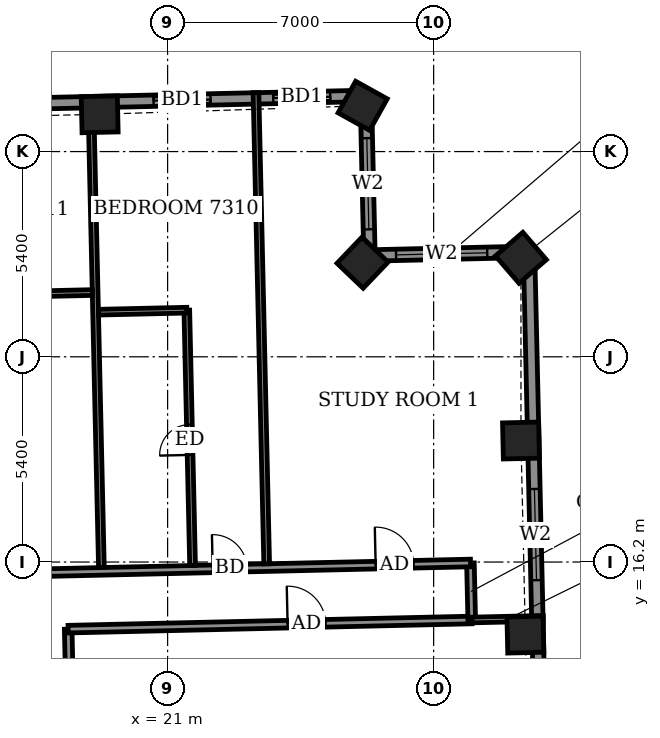
"""IFC4 building model, lengths in metres.
Left out: names, types, materials, properties, quantities, classifications, styles, units other than length and angle.
Written with IfcOpenShell. Run it as: python <this file> out.ifc"""

import sys

from ifc_helpers import new_model, si_unit, direction, frame, frame_2d, origin, origin_2d, place, context, subcontext, project, spatial, rectangle, extrude, element, fill, save


model = new_model("IFC4")
c1 = context("Model", 3, precision=1e-05, world=origin(), true_north=direction((0.0, 1.0)))
c2 = subcontext(c1, "Body", "Model", "MODEL_VIEW")
j1 = project(units=[si_unit("LENGTHUNIT", "METRE"), si_unit("PLANEANGLEUNIT", "RADIAN")], contexts=[c1])
p1 = place(None, origin())
s1 = spatial("IfcSite", under=j1, at=p1, CompositionType="ELEMENT")
p2 = place(p1, origin())
s2 = spatial("IfcBuilding", under=s1, at=p2, CompositionType="ELEMENT")
p3 = place(p2, frame((0.0, 0.0, 287.1)))
s3 = spatial("IfcBuildingStorey", under=s2, at=p3, CompositionType="ELEMENT", Elevation=287.1)
for number, where, z_axis, x_axis in (
    (1, (30.414, 14.29, -0.55), (0.0, 0.0, 1.0), (-0.023, 1.0, 0.0)),
    (2, (30.298, 19.397, -0.55), (0.0, 0.0, 1.0), (-0.023, 1.0, 0.0)),
    (3, (30.297, 24.205, -0.55), (0.0, 0.0, 1.0), (-0.652, 0.758, 0.0)),
    (4, (26.13, 24.077, -0.55), (0.0, 0.0, 1.0), (-0.723, 0.691, 0.0)),
    (5, (26.132, 28.204, -0.55), (0.0, 0.0, 1.0), (-0.874, 0.486, 0.0)),
    (6, (19.213, 27.981, -0.55), (0.0, 0.0, 1.0), (-1.0, -0.023, 0.0)),
):
    element("IfcColumn", number, at=place(p3, frame(where, z_axis=z_axis, x_axis=x_axis)), inside=s3, PredefinedType="COLUMN", context=c2, shape_type="SweptSolid", body=[
        extrude(rectangle(XDim=0.95, YDim=0.95, at=origin_2d()), origin(), (0.0, 0.0, 1.0), 3.6),
    ])
p4 = place(p3, frame((30.865, 8.716, 0.0), z_axis=(0.0, 0.0, 1.0), x_axis=(-0.022682425427, 0.999742720692, 0.0)))
e7 = element("IfcWall", 7, at=p4, inside=s3, PredefinedType="SOLIDWALL", context=c2, shape_type="SweptSolid", body=[
    extrude(rectangle(XDim=15.65, YDim=0.3, at=frame_2d((7.825, 0.0))), origin(), (0.0, 0.0, 1.0), 2.55),
])
p5 = place(p4, frame((2.279, 0.0, 0.0)))
e8 = element("IfcOpeningElement", 8, at=p5, cuts=e7, PredefinedType="OPENING", context=c2, shape_type="SweptSolid", body=[
    extrude(rectangle(XDim=1.5, YDim=2.4, at=frame_2d((0.75, 1.2))), frame((0.0, 0.16, 0.0), z_axis=(0.0, -1.0, 0.0), x_axis=(1.0, 0.0, 0.0)), (0.0, 0.0, 1.0), 0.32),
])
p6 = place(p4, frame((7.008, 0.0, 0.9)))
e9 = element("IfcOpeningElement", 9, at=p6, cuts=e7, PredefinedType="OPENING", context=c2, shape_type="SweptSolid", body=[
    extrude(rectangle(XDim=2.4, YDim=1.5, at=frame_2d((1.2, 0.75))), frame((0.0, 0.16, 0.0), z_axis=(0.0, -1.0, 0.0), x_axis=(1.0, 0.0, 0.0)), (0.0, 0.0, 1.0), 0.32),
])
p7 = place(p3, frame((30.51, 24.362, 0.0), z_axis=(0.0, 0.0, 1.0), x_axis=(-0.999739037152, -0.022844202663, 0.0)))
e10 = element("IfcWall", 10, at=p7, inside=s3, PredefinedType="SOLIDWALL", context=c2, shape_type="SweptSolid", body=[
    extrude(rectangle(XDim=4.2, YDim=0.3, at=frame_2d((2.1, 0.0))), origin(), (0.0, 0.0, 1.0), 2.55),
])
p8 = place(p7, frame((1.1, 0.0, 0.9)))
e11 = element("IfcOpeningElement", 11, at=p8, cuts=e10, PredefinedType="OPENING", context=c2, shape_type="SweptSolid", body=[
    extrude(rectangle(XDim=2.4, YDim=1.5, at=frame_2d((1.2, 0.75))), frame((0.0, 0.16, 0.0), z_axis=(0.0, -1.0, 0.0), x_axis=(1.0, 0.0, 0.0)), (0.0, 0.0, 1.0), 0.32),
])
p9 = place(p3, frame((26.311, 24.266, 0.0), z_axis=(0.0, 0.0, 1.0), x_axis=(-0.022611811187, 0.999744320311, 0.0)))
e12 = element("IfcWall", 12, at=p9, inside=s3, PredefinedType="SOLIDWALL", context=c2, shape_type="SweptSolid", body=[
    extrude(rectangle(XDim=4.2, YDim=0.3, at=frame_2d((2.1, 0.0))), origin(), (0.0, 0.0, 1.0), 2.55),
])
p10 = place(p9, frame((0.688, 0.0, 0.9)))
e13 = element("IfcOpeningElement", 13, at=p10, cuts=e12, PredefinedType="OPENING", context=c2, shape_type="SweptSolid", body=[
    extrude(rectangle(XDim=2.4, YDim=1.5, at=frame_2d((1.2, 0.75))), frame((0.0, 0.16, 0.0), z_axis=(0.0, -1.0, 0.0), x_axis=(1.0, 0.0, 0.0)), (0.0, 0.0, 1.0), 0.32),
])
p11 = place(p3, frame((26.216, 28.465, 0.0), z_axis=(0.0, 0.0, 1.0), x_axis=(-0.999742843677, -0.022677004157, 0.0)))
e14 = element("IfcWall", 14, at=p11, inside=s3, PredefinedType="SOLIDWALL", context=c2, shape_type="SweptSolid", body=[
    extrude(rectangle(XDim=49.836, YDim=0.3, at=frame_2d((24.918, 0.0))), origin(), (0.0, 0.0, 1.0), 2.5),
])
p12 = place(p11, frame((0.938, 0.0, 0.0)))
e15 = element("IfcOpeningElement", 15, at=p12, cuts=e14, PredefinedType="OPENING", context=c2, shape_type="SweptSolid", body=[
    extrude(rectangle(XDim=1.5, YDim=2.4, at=frame_2d((0.75, 1.2))), frame((0.0, 0.16, 0.0), z_axis=(0.0, -1.0, 0.0), x_axis=(1.0, 0.0, 0.0)), (0.0, 0.0, 1.0), 0.32),
])
p13 = place(p11, frame((4.087, 0.0, 0.0)))
e16 = element("IfcOpeningElement", 16, at=p13, cuts=e14, PredefinedType="OPENING", context=c2, shape_type="SweptSolid", body=[
    extrude(rectangle(XDim=1.5, YDim=2.4, at=frame_2d((0.75, 1.2))), frame((0.0, 0.16, 0.0), z_axis=(0.0, -1.0, 0.0), x_axis=(1.0, 0.0, 0.0)), (0.0, 0.0, 1.0), 0.32),
])
p14 = place(p11, frame((8.711, 0.0, 0.0)))
e17 = element("IfcOpeningElement", 17, at=p14, cuts=e14, PredefinedType="OPENING", context=c2, shape_type="SweptSolid", body=[
    extrude(rectangle(XDim=1.5, YDim=2.4, at=frame_2d((0.75, 1.2))), frame((0.0, 0.16, 0.0), z_axis=(0.0, -1.0, 0.0), x_axis=(1.0, 0.0, 0.0)), (0.0, 0.0, 1.0), 0.32),
])
p15 = place(p11, frame((12.067, 0.0, 0.0)))
e18 = element("IfcOpeningElement", 18, at=p15, cuts=e14, PredefinedType="OPENING", context=c2, shape_type="SweptSolid", body=[
    extrude(rectangle(XDim=1.5, YDim=2.4, at=frame_2d((0.75, 1.2))), frame((0.0, 0.16, 0.0), z_axis=(0.0, -1.0, 0.0), x_axis=(1.0, 0.0, 0.0)), (0.0, 0.0, 1.0), 0.32),
])
p16 = place(p11, frame((17.836, 0.0, 0.0)))
e19 = element("IfcOpeningElement", 19, at=p16, cuts=e14, PredefinedType="OPENING", context=c2, shape_type="SweptSolid", body=[
    extrude(rectangle(XDim=1.5, YDim=2.4, at=frame_2d((0.75, 1.2))), frame((0.0, 0.16, 0.0), z_axis=(0.0, -1.0, 0.0), x_axis=(1.0, 0.0, 0.0)), (0.0, 0.0, 1.0), 0.32),
])
p17 = place(p11, frame((22.849, 0.0, 0.0)))
e20 = element("IfcOpeningElement", 20, at=p17, cuts=e14, PredefinedType="OPENING", context=c2, shape_type="SweptSolid", body=[
    extrude(rectangle(XDim=1.5, YDim=2.4, at=frame_2d((0.75, 1.2))), frame((0.0, 0.16, 0.0), z_axis=(0.0, -1.0, 0.0), x_axis=(1.0, 0.0, 0.0)), (0.0, 0.0, 1.0), 0.32),
])
p18 = place(p11, frame((26.205, 0.0, 0.0)))
e21 = element("IfcOpeningElement", 21, at=p18, cuts=e14, PredefinedType="OPENING", context=c2, shape_type="SweptSolid", body=[
    extrude(rectangle(XDim=1.5, YDim=2.4, at=frame_2d((0.75, 1.2))), frame((0.0, 0.16, 0.0), z_axis=(0.0, -1.0, 0.0), x_axis=(1.0, 0.0, 0.0)), (0.0, 0.0, 1.0), 0.32),
])
p19 = place(p11, frame((32.011, 0.0, 0.0)))
e22 = element("IfcOpeningElement", 22, at=p19, cuts=e14, PredefinedType="OPENING", context=c2, shape_type="SweptSolid", body=[
    extrude(rectangle(XDim=1.5, YDim=2.4, at=frame_2d((0.75, 1.2))), frame((0.0, 0.16, 0.0), z_axis=(0.0, -1.0, 0.0), x_axis=(1.0, 0.0, 0.0)), (0.0, 0.0, 1.0), 0.32),
])
p20 = place(p11, frame((37.011, 0.0, 0.0)))
e23 = element("IfcOpeningElement", 23, at=p20, cuts=e14, PredefinedType="OPENING", context=c2, shape_type="SweptSolid", body=[
    extrude(rectangle(XDim=1.5, YDim=2.4, at=frame_2d((0.75, 1.2))), frame((0.0, 0.16, 0.0), z_axis=(0.0, -1.0, 0.0), x_axis=(1.0, 0.0, 0.0)), (0.0, 0.0, 1.0), 0.32),
])
p21 = place(p11, frame((40.367, 0.0, 0.0)))
e24 = element("IfcOpeningElement", 24, at=p21, cuts=e14, PredefinedType="OPENING", context=c2, shape_type="SweptSolid", body=[
    extrude(rectangle(XDim=1.5, YDim=2.4, at=frame_2d((0.75, 1.2))), frame((0.0, 0.16, 0.0), z_axis=(0.0, -1.0, 0.0), x_axis=(1.0, 0.0, 0.0)), (0.0, 0.0, 1.0), 0.32),
])
p22 = place(p11, frame((45.499, 0.0, 0.9)))
e25 = element("IfcOpeningElement", 25, at=p22, cuts=e14, PredefinedType="OPENING", context=c2, shape_type="SweptSolid", body=[
    extrude(rectangle(XDim=2.4, YDim=1.5, at=frame_2d((1.2, 0.75))), frame((0.0, 0.16, 0.0), z_axis=(0.0, -1.0, 0.0), x_axis=(1.0, 0.0, 0.0)), (0.0, 0.0, 1.0), 0.32),
])
p23 = place(p3, frame((18.537, 7.714, 0.0), z_axis=(0.0, 0.0, 1.0), x_axis=(-0.022773383809, 0.999740652864, 0.0)))
e26 = element("IfcWall", 26, at=p23, inside=s3, PredefinedType="PARTITIONING", context=c2, shape_type="SweptSolid", body=[
    extrude(rectangle(XDim=6.722, YDim=0.2, at=frame_2d((3.361, 0.0))), origin(), (0.0, 0.0, 1.0), 3.05),
])
p24 = place(p3, frame((18.382, 14.434, 0.0), z_axis=(0.0, 0.0, 1.0), x_axis=(0.999742819156, 0.02267808514, 0.0)))
e27 = element("IfcWall", 27, at=p24, inside=s3, PredefinedType="PARTITIONING", context=c2, shape_type="SweptSolid", body=[
    extrude(rectangle(XDim=10.625, YDim=0.2, at=frame_2d((5.313, 0.0))), origin(), (0.0, 0.0, 1.0), 3.05),
])
p25 = place(p24, frame((5.777, 0.0, 0.0)))
e28 = element("IfcOpeningElement", 28, at=p25, cuts=e27, PredefinedType="OPENING", context=c2, shape_type="SweptSolid", body=[
    extrude(rectangle(XDim=1.0, YDim=2.1, at=frame_2d((0.5, 1.05))), frame((0.0, 0.11, 0.0), z_axis=(0.0, -1.0, 0.0), x_axis=(1.0, 0.0, 0.0)), (0.0, 0.0, 1.0), 0.22),
])
p26 = place(p3, frame((29.002, 14.675, 0.0), z_axis=(0.0, 0.0, 1.0), x_axis=(-0.022617910375, 0.999744182344, 0.0)))
e29 = element("IfcWall", 29, at=p26, inside=s3, PredefinedType="PARTITIONING", context=c2, shape_type="SweptSolid", body=[
    extrude(rectangle(XDim=1.5, YDim=0.2, at=frame_2d((0.75, 0.0))), origin(), (0.0, 0.0, 1.0), 3.05),
])
p27 = place(p3, frame((29.005, 14.675, 0.0), z_axis=(0.0, 0.0, 1.0), x_axis=(0.999737243051, 0.022922583999, 0.0)))
e30 = element("IfcWall", 30, at=p27, inside=s3, PredefinedType="PARTITIONING", context=c2, shape_type="SweptSolid", body=[
    extrude(rectangle(XDim=1.875, YDim=0.15, at=frame_2d((0.937, 0.0))), origin(), (0.0, 0.0, 1.0), 2.55),
])
p28 = place(p3, frame((-26.401, 14.918, 0.0), z_axis=(0.0, 0.0, 1.0), x_axis=(0.99974239733, 0.022696673341, 0.0)))
e31 = element("IfcWall", 31, at=p28, inside=s3, PredefinedType="PARTITIONING", context=c2, shape_type="SweptSolid", body=[
    extrude(rectangle(XDim=55.386, YDim=0.2, at=frame_2d((27.693, 0.0))), origin(), (0.0, 0.0, 1.0), 3.05),
])
p29 = place(p28, frame((52.889, 0.0, 0.0)))
e32 = element("IfcOpeningElement", 32, at=p29, cuts=e31, PredefinedType="OPENING", context=c2, shape_type="SweptSolid", body=[
    extrude(rectangle(XDim=1.0, YDim=2.1, at=frame_2d((0.5, 1.05))), frame((0.0, 0.11, 0.0), z_axis=(0.0, -1.0, 0.0), x_axis=(1.0, 0.0, 0.0)), (0.0, 0.0, 1.0), 0.22),
])
p30 = place(p28, frame((48.6, 0.0, 0.0)))
e33 = element("IfcOpeningElement", 33, at=p30, cuts=e31, PredefinedType="OPENING", context=c2, shape_type="SweptSolid", body=[
    extrude(rectangle(XDim=0.9, YDim=2.1, at=frame_2d((0.45, 1.05))), frame((0.0, 0.11, 0.0), z_axis=(0.0, -1.0, 0.0), x_axis=(1.0, 0.0, 0.0)), (0.0, 0.0, 1.0), 0.22),
])
p31 = place(p28, frame((41.8, 0.0, 0.0)))
e34 = element("IfcOpeningElement", 34, at=p31, cuts=e31, PredefinedType="OPENING", context=c2, shape_type="SweptSolid", body=[
    extrude(rectangle(XDim=0.9, YDim=2.1, at=frame_2d((0.45, 1.05))), frame((0.0, 0.11, 0.0), z_axis=(0.0, -1.0, 0.0), x_axis=(1.0, 0.0, 0.0)), (0.0, 0.0, 1.0), 0.22),
])
p32 = place(p28, frame((39.675, 0.0, 0.0)))
e35 = element("IfcOpeningElement", 35, at=p32, cuts=e31, PredefinedType="OPENING", context=c2, shape_type="SweptSolid", body=[
    extrude(rectangle(XDim=0.9, YDim=2.1, at=frame_2d((0.45, 1.05))), frame((0.0, 0.11, 0.0), z_axis=(0.0, -1.0, 0.0), x_axis=(1.0, 0.0, 0.0)), (0.0, 0.0, 1.0), 0.22),
])
p33 = place(p28, frame((32.675, 0.0, 0.0)))
e36 = element("IfcOpeningElement", 36, at=p33, cuts=e31, PredefinedType="OPENING", context=c2, shape_type="SweptSolid", body=[
    extrude(rectangle(XDim=0.9, YDim=2.1, at=frame_2d((0.45, 1.05))), frame((0.0, 0.11, 0.0), z_axis=(0.0, -1.0, 0.0), x_axis=(1.0, 0.0, 0.0)), (0.0, 0.0, 1.0), 0.22),
])
p34 = place(p28, frame((30.4, 0.0, 0.0)))
e37 = element("IfcOpeningElement", 37, at=p34, cuts=e31, PredefinedType="OPENING", context=c2, shape_type="SweptSolid", body=[
    extrude(rectangle(XDim=0.9, YDim=2.1, at=frame_2d((0.45, 1.05))), frame((0.0, 0.11, 0.0), z_axis=(0.0, -1.0, 0.0), x_axis=(1.0, 0.0, 0.0)), (0.0, 0.0, 1.0), 0.22),
])
p35 = place(p28, frame((23.225, 0.0, 0.0)))
e38 = element("IfcOpeningElement", 38, at=p35, cuts=e31, PredefinedType="OPENING", context=c2, shape_type="SweptSolid", body=[
    extrude(rectangle(XDim=0.9, YDim=2.1, at=frame_2d((0.45, 1.05))), frame((0.0, 0.11, 0.0), z_axis=(0.0, -1.0, 0.0), x_axis=(1.0, 0.0, 0.0)), (0.0, 0.0, 1.0), 0.22),
])
p36 = place(p28, frame((20.9, 0.0, 0.0)))
e39 = element("IfcOpeningElement", 39, at=p36, cuts=e31, PredefinedType="OPENING", context=c2, shape_type="SweptSolid", body=[
    extrude(rectangle(XDim=0.9, YDim=2.1, at=frame_2d((0.45, 1.05))), frame((0.0, 0.11, 0.0), z_axis=(0.0, -1.0, 0.0), x_axis=(1.0, 0.0, 0.0)), (0.0, 0.0, 1.0), 0.22),
])
p37 = place(p28, frame((13.9, 0.0, 0.0)))
e40 = element("IfcOpeningElement", 40, at=p37, cuts=e31, PredefinedType="OPENING", context=c2, shape_type="SweptSolid", body=[
    extrude(rectangle(XDim=0.9, YDim=2.1, at=frame_2d((0.45, 1.05))), frame((0.0, 0.11, 0.0), z_axis=(0.0, -1.0, 0.0), x_axis=(1.0, 0.0, 0.0)), (0.0, 0.0, 1.0), 0.22),
])
p38 = place(p28, frame((11.775, 0.0, 0.0)))
e41 = element("IfcOpeningElement", 41, at=p38, cuts=e31, PredefinedType="OPENING", context=c2, shape_type="SweptSolid", body=[
    extrude(rectangle(XDim=0.9, YDim=2.1, at=frame_2d((0.45, 1.05))), frame((0.0, 0.11, 0.0), z_axis=(0.0, -1.0, 0.0), x_axis=(1.0, 0.0, 0.0)), (0.0, 0.0, 1.0), 0.22),
])
p39 = place(p28, frame((1.65, 0.0, 0.0)))
e42 = element("IfcOpeningElement", 42, at=p39, cuts=e31, PredefinedType="OPENING", context=c2, shape_type="SweptSolid", body=[
    extrude(rectangle(XDim=1.0, YDim=2.1, at=frame_2d((0.5, 1.05))), frame((0.0, 0.11, 0.0), z_axis=(0.0, -1.0, 0.0), x_axis=(1.0, 0.0, 0.0)), (0.0, 0.0, 1.0), 0.22),
])
p40 = place(p28, frame((7.025, 0.0, 0.0)))
e43 = element("IfcOpeningElement", 43, at=p40, cuts=e31, PredefinedType="OPENING", context=c2, shape_type="SweptSolid", body=[
    extrude(rectangle(XDim=0.9, YDim=2.1, at=frame_2d((0.45, 1.05))), frame((0.0, 0.11, 0.0), z_axis=(0.0, -1.0, 0.0), x_axis=(1.0, 0.0, 0.0)), (0.0, 0.0, 1.0), 0.22),
])
p41 = place(p3, frame((19.258, 16.054, 0.0), z_axis=(0.0, 0.0, 1.0), x_axis=(-0.022740189192, 0.999741408463, 0.0)))
e44 = element("IfcWall", 44, at=p41, inside=s3, PredefinedType="PARTITIONING", context=c2, shape_type="SweptSolid", body=[
    extrude(rectangle(XDim=12.4, YDim=0.15, at=frame_2d((6.2, 0.0))), origin(), (0.0, 0.0, 1.0), 3.05),
])
p42 = place(p3, frame((21.657, 16.109, 0.0), z_axis=(0.0, 0.0, 1.0), x_axis=(-0.022634748998, 0.99974380125, 0.0)))
e45 = element("IfcWall", 45, at=p42, inside=s3, PredefinedType="PARTITIONING", context=c2, shape_type="SweptSolid", body=[
    extrude(rectangle(XDim=6.72, YDim=0.15, at=frame_2d((3.36, 0.0))), origin(), (0.0, 0.0, 1.0), 3.05),
])
p43 = place(p42, frame((2.91, 0.0, 0.0)))
e46 = element("IfcOpeningElement", 46, at=p43, cuts=e45, PredefinedType="OPENING", context=c2, shape_type="SweptSolid", body=[
    extrude(rectangle(XDim=0.8, YDim=2.1, at=frame_2d((0.4, 1.05))), frame((0.0, 0.085, 0.0), z_axis=(0.0, -1.0, 0.0), x_axis=(1.0, 0.0, 0.0)), (0.0, 0.0, 1.0), 0.17),
])
p44 = place(p3, frame((23.607, 16.153, 0.0), z_axis=(0.0, 0.0, 1.0), x_axis=(-0.022740189192, 0.999741408463, 0.0)))
e47 = element("IfcWall", 47, at=p44, inside=s3, PredefinedType="PARTITIONING", context=c2, shape_type="SweptSolid", body=[
    extrude(rectangle(XDim=12.4, YDim=0.15, at=frame_2d((6.2, 0.0))), origin(), (0.0, 0.0, 1.0), 2.55),
])
p45 = place(p3, frame((19.182, 22.774, 0.0), z_axis=(0.0, 0.0, 1.0), x_axis=(0.99974053329, 0.022778632478, 0.0)))
e48 = element("IfcWall", 48, at=p45, inside=s3, PredefinedType="PARTITIONING", context=c2, shape_type="SweptSolid", body=[
    extrude(rectangle(XDim=2.326, YDim=0.15, at=frame_2d((1.163, 0.0))), origin(), (0.0, 0.0, 1.0), 3.05),
])
p46 = place(p3, frame((16.696, 23.238, 0.0), z_axis=(0.0, 0.0, 1.0), x_axis=(0.999740478815, 0.022781023197, 0.0)))
e49 = element("IfcWall", 49, at=p46, inside=s3, PredefinedType="PARTITIONING", context=c2, shape_type="SweptSolid", body=[
    extrude(rectangle(XDim=2.325, YDim=0.15, at=frame_2d((1.163, 0.0))), origin(), (0.0, 0.0, 1.0), 3.05),
])
p47 = place(p6, origin())
e50 = element("IfcWindow", 50, at=p47, inside=s3, PartitioningType="DOUBLE_PANEL_VERTICAL", PredefinedType="WINDOW", context=c2, shape_type="SweptSolid", body=[
    extrude(rectangle(XDim=2.4, YDim=1.5, at=frame_2d((1.2, 0.75))), frame((0.0, 0.03, 0.0), z_axis=(0.0, -1.0, 0.0), x_axis=(1.0, 0.0, 0.0)), (0.0, 0.0, 1.0), 0.06),
])
fill(e9, e50)
p48 = place(p8, origin())
e51 = element("IfcWindow", 51, at=p48, inside=s3, PartitioningType="DOUBLE_PANEL_VERTICAL", PredefinedType="WINDOW", context=c2, shape_type="SweptSolid", body=[
    extrude(rectangle(XDim=2.4, YDim=1.5, at=frame_2d((1.2, 0.75))), frame((0.0, 0.03, 0.0), z_axis=(0.0, -1.0, 0.0), x_axis=(1.0, 0.0, 0.0)), (0.0, 0.0, 1.0), 0.06),
])
fill(e11, e51)
p49 = place(p10, origin())
e52 = element("IfcWindow", 52, at=p49, inside=s3, PartitioningType="DOUBLE_PANEL_VERTICAL", PredefinedType="WINDOW", context=c2, shape_type="SweptSolid", body=[
    extrude(rectangle(XDim=2.4, YDim=1.5, at=frame_2d((1.2, 0.75))), frame((0.0, 0.03, 0.0), z_axis=(0.0, -1.0, 0.0), x_axis=(1.0, 0.0, 0.0)), (0.0, 0.0, 1.0), 0.06),
])
fill(e13, e52)
p50 = place(p12, origin())
e53 = element("IfcDoor", 53, at=p50, inside=s3, OperationType="SLIDING_TO_LEFT", PredefinedType="DOOR", context=c2, shape_type="SweptSolid", body=[
    extrude(rectangle(XDim=1.5, YDim=2.4, at=frame_2d((0.75, 1.2))), frame((0.0, 0.025, 0.0), z_axis=(0.0, -1.0, 0.0), x_axis=(1.0, 0.0, 0.0)), (0.0, 0.0, 1.0), 0.05),
])
fill(e15, e53)
p51 = place(p13, origin())
e54 = element("IfcDoor", 54, at=p51, inside=s3, OperationType="SLIDING_TO_LEFT", PredefinedType="DOOR", context=c2, shape_type="SweptSolid", body=[
    extrude(rectangle(XDim=1.5, YDim=2.4, at=frame_2d((0.75, 1.2))), frame((0.0, 0.025, 0.0), z_axis=(0.0, -1.0, 0.0), x_axis=(1.0, 0.0, 0.0)), (0.0, 0.0, 1.0), 0.05),
])
fill(e16, e54)
p52 = place(p25, origin())
e55 = element("IfcDoor", 55, at=p52, inside=s3, OperationType="SINGLE_SWING_RIGHT", PredefinedType="DOOR", context=c2, shape_type="SweptSolid", body=[
    extrude(rectangle(XDim=1.0, YDim=2.1, at=frame_2d((0.5, 1.05))), frame((0.0, 0.025, 0.0), z_axis=(0.0, -1.0, 0.0), x_axis=(1.0, 0.0, 0.0)), (0.0, 0.0, 1.0), 0.05),
])
fill(e28, e55)
p53 = place(p29, origin())
e56 = element("IfcDoor", 56, at=p53, inside=s3, OperationType="SINGLE_SWING_LEFT", PredefinedType="DOOR", context=c2, shape_type="SweptSolid", body=[
    extrude(rectangle(XDim=1.0, YDim=2.1, at=frame_2d((0.5, 1.05))), frame((0.0, 0.025, 0.0), z_axis=(0.0, -1.0, 0.0), x_axis=(1.0, 0.0, 0.0)), (0.0, 0.0, 1.0), 0.05),
])
fill(e32, e56)
p54 = place(p30, origin())
e57 = element("IfcDoor", 57, at=p54, inside=s3, OperationType="SINGLE_SWING_RIGHT", PredefinedType="DOOR", context=c2, shape_type="SweptSolid", body=[
    extrude(rectangle(XDim=0.9, YDim=2.1, at=frame_2d((0.45, 1.05))), frame((0.0, 0.025, 0.0), z_axis=(0.0, -1.0, 0.0), x_axis=(1.0, 0.0, 0.0)), (0.0, 0.0, 1.0), 0.05),
])
fill(e33, e57)
p55 = place(p43, origin())
e58 = element("IfcDoor", 58, at=p55, inside=s3, OperationType="SINGLE_SWING_RIGHT", PredefinedType="DOOR", context=c2, shape_type="SweptSolid", body=[
    extrude(rectangle(XDim=0.8, YDim=2.1, at=frame_2d((0.4, 1.05))), frame((0.0, 0.025, 0.0), z_axis=(0.0, -1.0, 0.0), x_axis=(1.0, 0.0, 0.0)), (0.0, 0.0, 1.0), 0.05),
])
fill(e46, e58)
save(model, sys.argv[1])
